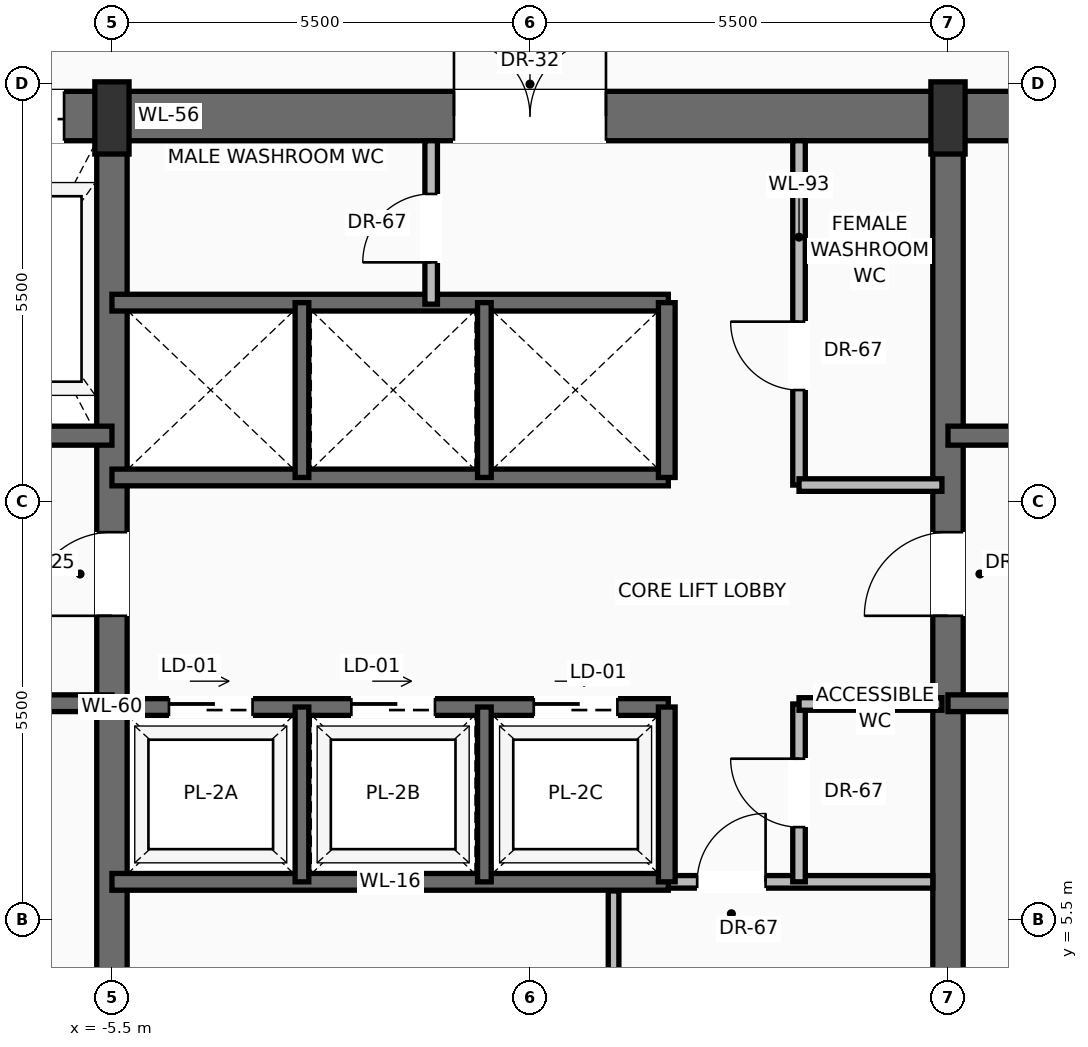
"""IFC4 building model, lengths in metres.
Left out: names, types, materials, properties, quantities, classifications, styles, units other than length and angle.
Written with IfcOpenShell. Run it as: python <this file> out.ifc"""

import sys

from ifc_helpers import new_model, si_unit, direction, frame, frame_2d, origin, origin_2d, place, context, subcontext, project, spatial, rectangle, extrude, source, transform, mapped, element, fill, save


model = new_model("IFC4")
c1 = context("Model", 3, precision=1e-05, world=origin(), true_north=direction((0.0, 1.0)))
c2 = subcontext(c1, "Body", "Model", "MODEL_VIEW")
j1 = project(units=[si_unit("LENGTHUNIT", "METRE"), si_unit("PLANEANGLEUNIT", "RADIAN")], contexts=[c1])
p1 = place(None, origin())
s1 = spatial("IfcSite", under=j1, at=p1, CompositionType="ELEMENT")
p2 = place(p1, origin())
s2 = spatial("IfcBuilding", under=s1, at=p2, CompositionType="ELEMENT")
p3 = place(p2, frame((0.0, 0.0, 133.0)))
s3 = spatial("IfcBuildingStorey", under=s2, at=p3, CompositionType="ELEMENT", Elevation=133.0)
p4 = place(p3, frame((-10.8, 16.075, 0.0), z_axis=(0.0, 0.0, 1.0), x_axis=(1.0, 0.0, 0.0)))
e1 = element("IfcWall", 1, at=p4, inside=s3, PredefinedType="SHEAR", context=c2, shape_type="SweptSolid", body=[
    extrude(rectangle(XDim=21.6, YDim=0.65, at=frame_2d((10.8, 0.0))), origin(), (0.0, 0.0, 1.0), 3.47),
])
p5 = place(p4, frame((3.37, 0.0, 0.0)))
e2 = element("IfcOpeningElement", 2, at=p5, cuts=e1, PredefinedType="OPENING", context=c2, shape_type="SweptSolid", body=[
    extrude(rectangle(XDim=1.3, YDim=2.3, at=frame_2d((0.65, 1.15))), frame((0.0, 0.335, 0.0), z_axis=(0.0, -1.0, 0.0), x_axis=(1.0, 0.0, 0.0)), (0.0, 0.0, 1.0), 0.67),
])
p6 = place(p4, frame((9.8, 0.0, 0.0)))
e3 = element("IfcOpeningElement", 3, at=p6, cuts=e1, PredefinedType="OPENING", context=c2, shape_type="SweptSolid", body=[
    extrude(rectangle(XDim=2.0, YDim=2.4, at=frame_2d((1.0, 1.2))), frame((0.0, 0.335, 0.0), z_axis=(0.0, -1.0, 0.0), x_axis=(1.0, 0.0, 0.0)), (0.0, 0.0, 1.0), 0.67),
])
p7 = place(p3, frame((-5.5, 0.525, 0.0), z_axis=(0.0, 0.0, 1.0), x_axis=(0.0, 1.0, 0.0)))
e4 = element("IfcWall", 4, at=p7, inside=s3, PredefinedType="SHEAR", context=c2, shape_type="SweptSolid", body=[
    extrude(rectangle(XDim=15.55, YDim=0.4, at=frame_2d((7.775, 0.0))), origin(), (0.0, 0.0, 1.0), 3.47),
])
p8 = place(p7, frame((8.975, 0.0, 0.0)))
e5 = element("IfcOpeningElement", 5, at=p8, cuts=e4, PredefinedType="OPENING", context=c2, shape_type="SweptSolid", body=[
    extrude(rectangle(XDim=1.1, YDim=2.2, at=frame_2d((0.55, 1.1))), frame((0.0, 0.21, 0.0), z_axis=(0.0, -1.0, 0.0), x_axis=(1.0, 0.0, 0.0)), (0.0, 0.0, 1.0), 0.42),
])
p9 = place(p3, frame((5.5, 0.525, 0.0), z_axis=(0.0, 0.0, 1.0), x_axis=(0.0, 1.0, 0.0)))
e6 = element("IfcWall", 6, at=p9, inside=s3, PredefinedType="SHEAR", context=c2, shape_type="SweptSolid", body=[
    extrude(rectangle(XDim=15.55, YDim=0.4, at=frame_2d((7.775, 0.0))), origin(), (0.0, 0.0, 1.0), 3.47),
])
p10 = place(p9, frame((8.975, 0.0, 0.0)))
e7 = element("IfcOpeningElement", 7, at=p10, cuts=e6, PredefinedType="OPENING", context=c2, shape_type="SweptSolid", body=[
    extrude(rectangle(XDim=1.1, YDim=2.2, at=frame_2d((0.55, 1.1))), frame((0.0, 0.21, 0.0), z_axis=(0.0, -1.0, 0.0), x_axis=(1.0, 0.0, 0.0)), (0.0, 0.0, 1.0), 0.42),
])
m1 = source(origin(), c2, "Body", "SweptSolid", [
    extrude(rectangle(XDim=0.45, YDim=0.95, at=origin_2d()), origin(), (0.0, 0.0, 1.0), 3.7),
])
for number, where, z_axis, x_axis in (
    (8, (-5.5, 16.05, 0.0), (0.0, 0.0, 1.0), (1.0, 0.0, 0.0)),
    (9, (5.5, 16.05, 0.0), (0.0, 0.0, 1.0), (1.0, 0.0, 0.0)),
):
    element("IfcColumn", number, at=place(p3, frame(where, z_axis=z_axis, x_axis=x_axis)), inside=s3, PredefinedType="PILASTER", context=c2, shape_type="MappedRepresentation", body=[
        mapped(m1, transform((0.0, 0.0, 0.0), scale=1.0)),
    ])
p11 = place(p3, frame((-5.5, 8.35, 0.0), z_axis=(0.0, 0.0, 1.0), x_axis=(-1.0, 0.0, 0.0)))
e10 = element("IfcWall", 10, at=p11, inside=s3, PredefinedType="SOLIDWALL", context=c2, shape_type="SweptSolid", body=[
    extrude(rectangle(XDim=4.65, YDim=0.22, at=frame_2d((2.325, 0.0))), origin(), (0.0, 0.0, 1.0), 3.47),
])
p12 = place(p11, frame((2.5, 0.0, 0.0)))
e11 = element("IfcOpeningElement", 11, at=p12, cuts=e10, PredefinedType="OPENING", context=c2, shape_type="SweptSolid", body=[
    extrude(rectangle(XDim=1.15, YDim=2.2, at=frame_2d((0.575, 1.1))), frame((0.0, 0.12, 0.0), z_axis=(0.0, -1.0, 0.0), x_axis=(1.0, 0.0, 0.0)), (0.0, 0.0, 1.0), 0.24),
])
p13 = place(p3, frame((-5.5, 11.87, 0.0), z_axis=(0.0, 0.0, 1.0), x_axis=(-1.0, 0.0, 0.0)))
e12 = element("IfcWall", 12, at=p13, inside=s3, PredefinedType="SOLIDWALL", context=c2, shape_type="SweptSolid", body=[
    extrude(rectangle(XDim=4.65, YDim=0.25, at=frame_2d((2.325, 0.0))), origin(), (0.0, 0.0, 1.0), 3.47),
])
p14 = place(p13, frame((2.95, 0.0, 0.0)))
e13 = element("IfcOpeningElement", 13, at=p14, cuts=e12, PredefinedType="OPENING", context=c2, shape_type="SweptSolid", body=[
    extrude(rectangle(XDim=1.2, YDim=2.25, at=frame_2d((0.6, 1.125))), frame((0.0, 0.135, 0.0), z_axis=(0.0, -1.0, 0.0), x_axis=(1.0, 0.0, 0.0)), (0.0, 0.0, 1.0), 0.27),
])
p15 = place(p3, frame((10.15, 8.35, 0.0), z_axis=(0.0, 0.0, 1.0), x_axis=(-1.0, 0.0, 0.0)))
e14 = element("IfcWall", 14, at=p15, inside=s3, PredefinedType="SOLIDWALL", context=c2, shape_type="SweptSolid", body=[
    extrude(rectangle(XDim=4.65, YDim=0.22, at=frame_2d((2.325, 0.0))), origin(), (0.0, 0.0, 1.0), 3.47),
])
p16 = place(p15, frame((1.0, 0.0, 0.0)))
e15 = element("IfcOpeningElement", 15, at=p16, cuts=e14, PredefinedType="OPENING", context=c2, shape_type="SweptSolid", body=[
    extrude(rectangle(XDim=1.15, YDim=2.2, at=frame_2d((0.575, 1.1))), frame((0.0, 0.12, 0.0), z_axis=(0.0, -1.0, 0.0), x_axis=(1.0, 0.0, 0.0)), (0.0, 0.0, 1.0), 0.24),
])
p17 = place(p3, frame((10.15, 11.87, 0.0), z_axis=(0.0, 0.0, 1.0), x_axis=(-1.0, 0.0, 0.0)))
e16 = element("IfcWall", 16, at=p17, inside=s3, PredefinedType="SOLIDWALL", context=c2, shape_type="SweptSolid", body=[
    extrude(rectangle(XDim=4.65, YDim=0.25, at=frame_2d((2.325, 0.0))), origin(), (0.0, 0.0, 1.0), 3.47),
])
p18 = place(p17, frame((0.5, 0.0, 0.0)))
e17 = element("IfcOpeningElement", 17, at=p18, cuts=e16, PredefinedType="OPENING", context=c2, shape_type="SweptSolid", body=[
    extrude(rectangle(XDim=1.2, YDim=2.25, at=frame_2d((0.6, 1.125))), frame((0.0, 0.135, 0.0), z_axis=(0.0, -1.0, 0.0), x_axis=(1.0, 0.0, 0.0)), (0.0, 0.0, 1.0), 0.27),
])
p19 = place(p3, frame((1.82, 6.0, 0.0), z_axis=(0.0, 0.0, 1.0), x_axis=(1.0, 0.0, 0.0)))
e18 = element("IfcWall", 18, at=p19, inside=s3, PredefinedType="PARTITIONING", context=c2, shape_type="SweptSolid", body=[
    extrude(rectangle(XDim=3.48, YDim=0.165, at=frame_2d((1.74, 0.0))), origin(), (0.0, 0.0, 1.0), 3.462),
])
p20 = place(p19, frame((0.38, 0.0, 0.0)))
e19 = element("IfcOpeningElement", 19, at=p20, cuts=e18, PredefinedType="OPENING", context=c2, shape_type="SweptSolid", body=[
    extrude(rectangle(XDim=0.9, YDim=2.1, at=frame_2d((0.45, 1.05))), frame((0.0, 0.093, 0.0), z_axis=(0.0, -1.0, 0.0), x_axis=(1.0, 0.0, 0.0)), (0.0, 0.0, 1.0), 0.185),
])
p21 = place(p3, frame((1.1, 0.85, 0.0), z_axis=(0.0, 0.0, 1.0), x_axis=(0.0, 1.0, 0.0)))
e20 = element("IfcWall", 20, at=p21, inside=s3, PredefinedType="PARTITIONING", context=c2, shape_type="SweptSolid", body=[
    extrude(rectangle(XDim=5.03, YDim=0.14, at=frame_2d((2.515, 0.0))), origin(), (0.0, 0.0, 1.0), 3.462),
])
p22 = place(p21, frame((2.1, 0.0, 0.0)))
e21 = element("IfcOpeningElement", 21, at=p22, cuts=e20, PredefinedType="OPENING", context=c2, shape_type="SweptSolid", body=[
    extrude(rectangle(XDim=0.9, YDim=2.1, at=frame_2d((0.45, 1.05))), frame((0.0, 0.08, 0.0), z_axis=(0.0, -1.0, 0.0), x_axis=(1.0, 0.0, 0.0)), (0.0, 0.0, 1.0), 0.16),
])
p23 = place(p3, frame((3.54, 6.0, 0.0), z_axis=(0.0, 0.0, 1.0), x_axis=(0.0, 1.0, 0.0)))
e22 = element("IfcWall", 22, at=p23, inside=s3, PredefinedType="PARTITIONING", context=c2, shape_type="SweptSolid", body=[
    extrude(rectangle(XDim=2.34, YDim=0.165, at=frame_2d((1.17, 0.0))), origin(), (0.0, 0.0, 1.0), 3.462),
])
p24 = place(p23, frame((0.72, 0.0, 0.0)))
e23 = element("IfcOpeningElement", 23, at=p24, cuts=e22, PredefinedType="OPENING", context=c2, shape_type="SweptSolid", body=[
    extrude(rectangle(XDim=0.9, YDim=2.1, at=frame_2d((0.45, 1.05))), frame((0.0, 0.093, 0.0), z_axis=(0.0, -1.0, 0.0), x_axis=(1.0, 0.0, 0.0)), (0.0, 0.0, 1.0), 0.185),
])
p25 = place(p3, frame((3.54, 8.34, 0.0), z_axis=(0.0, 0.0, 1.0), x_axis=(1.0, 0.0, 0.0)))
e24 = element("IfcWall", 24, at=p25, inside=s3, PredefinedType="PARTITIONING", context=c2, shape_type="SweptSolid", body=[
    extrude(rectangle(XDim=1.88, YDim=0.165, at=frame_2d((0.94, 0.0))), origin(), (0.0, 0.0, 1.0), 3.462),
])
p26 = place(p3, frame((-5.5, 6.0, 0.0), z_axis=(0.0, 0.0, 1.0), x_axis=(1.0, 0.0, 0.0)))
e25 = element("IfcWall", 25, at=p26, inside=s3, PredefinedType="SOLIDWALL", context=c2, shape_type="SweptSolid", body=[
    extrude(rectangle(XDim=7.32, YDim=0.22, at=frame_2d((3.66, 0.0))), origin(), (0.0, 0.0, 1.0), 3.47),
])
p27 = place(p3, frame((-5.5, 8.3, 0.0), z_axis=(0.0, 0.0, 1.0), x_axis=(1.0, 0.0, 0.0)))
e26 = element("IfcWall", 26, at=p27, inside=s3, PredefinedType="SOLIDWALL", context=c2, shape_type="SweptSolid", body=[
    extrude(rectangle(XDim=7.32, YDim=0.22, at=frame_2d((3.66, 0.0))), origin(), (0.0, 0.0, 1.0), 3.47),
])
p28 = place(p27, frame((0.75, 0.0, 0.0)))
e27 = element("IfcOpeningElement", 27, at=p28, cuts=e26, PredefinedType="OPENING", context=c2, shape_type="SweptSolid", body=[
    extrude(rectangle(XDim=1.1, YDim=2.2, at=frame_2d((0.55, 1.1))), frame((0.0, 0.12, 0.0), z_axis=(0.0, -1.0, 0.0), x_axis=(1.0, 0.0, 0.0)), (0.0, 0.0, 1.0), 0.24),
])
p29 = place(p27, frame((3.15, 0.0, 0.0)))
e28 = element("IfcOpeningElement", 28, at=p29, cuts=e26, PredefinedType="OPENING", context=c2, shape_type="SweptSolid", body=[
    extrude(rectangle(XDim=1.1, YDim=2.2, at=frame_2d((0.55, 1.1))), frame((0.0, 0.12, 0.0), z_axis=(0.0, -1.0, 0.0), x_axis=(1.0, 0.0, 0.0)), (0.0, 0.0, 1.0), 0.24),
])
p30 = place(p27, frame((5.55, 0.0, 0.0)))
e29 = element("IfcOpeningElement", 29, at=p30, cuts=e26, PredefinedType="OPENING", context=c2, shape_type="SweptSolid", body=[
    extrude(rectangle(XDim=1.1, YDim=2.2, at=frame_2d((0.55, 1.1))), frame((0.0, 0.12, 0.0), z_axis=(0.0, -1.0, 0.0), x_axis=(1.0, 0.0, 0.0)), (0.0, 0.0, 1.0), 0.24),
])
p31 = place(p3, frame((1.8, 6.0, 0.0), z_axis=(0.0, 0.0, 1.0), x_axis=(0.0, 1.0, 0.0)))
e30 = element("IfcWall", 30, at=p31, inside=s3, PredefinedType="SOLIDWALL", context=c2, shape_type="SweptSolid", body=[
    extrude(rectangle(XDim=2.3, YDim=0.22, at=frame_2d((1.15, 0.0))), origin(), (0.0, 0.0, 1.0), 3.47),
])
for number, where, z_axis, x_axis in (
    (31, (-3.0, 6.0, 0.0), (0.0, 0.0, 1.0), (0.0, 1.0, 0.0)),
    (32, (-0.6, 6.0, 0.0), (0.0, 0.0, 1.0), (0.0, 1.0, 0.0)),
):
    element("IfcWall", number, at=place(p3, frame(where, z_axis=z_axis, x_axis=x_axis)), inside=s3, PredefinedType="SOLIDWALL", context=c2, shape_type="SweptSolid", body=[
        extrude(rectangle(XDim=2.3, YDim=0.18, at=frame_2d((1.15, 0.0))), origin(), (0.0, 0.0, 1.0), 3.47),
    ])
for number, where, z_axis, x_axis in (
    (33, (-5.5, 11.32, 0.0), (0.0, 0.0, 1.0), (1.0, 0.0, 0.0)),
    (34, (-5.5, 13.62, 0.0), (0.0, 0.0, 1.0), (1.0, 0.0, 0.0)),
):
    element("IfcWall", number, at=place(p3, frame(where, z_axis=z_axis, x_axis=x_axis)), inside=s3, PredefinedType="SOLIDWALL", context=c2, shape_type="SweptSolid", body=[
        extrude(rectangle(XDim=7.32, YDim=0.22, at=frame_2d((3.66, 0.0))), origin(), (0.0, 0.0, 1.0), 3.47),
    ])
p32 = place(p3, frame((1.8, 11.32, 0.0), z_axis=(0.0, 0.0, 1.0), x_axis=(0.0, 1.0, 0.0)))
e35 = element("IfcWall", 35, at=p32, inside=s3, PredefinedType="SOLIDWALL", context=c2, shape_type="SweptSolid", body=[
    extrude(rectangle(XDim=2.3, YDim=0.22, at=frame_2d((1.15, 0.0))), origin(), (0.0, 0.0, 1.0), 3.47),
])
for number, where, z_axis, x_axis in (
    (36, (-3.0, 11.32, 0.0), (0.0, 0.0, 1.0), (0.0, 1.0, 0.0)),
    (37, (-0.6, 11.32, 0.0), (0.0, 0.0, 1.0), (0.0, 1.0, 0.0)),
):
    element("IfcWall", number, at=place(p3, frame(where, z_axis=z_axis, x_axis=x_axis)), inside=s3, PredefinedType="SOLIDWALL", context=c2, shape_type="SweptSolid", body=[
        extrude(rectangle(XDim=2.3, YDim=0.18, at=frame_2d((1.15, 0.0))), origin(), (0.0, 0.0, 1.0), 3.47),
    ])
p33 = place(p3, frame((-1.3, 13.6, 0.0), z_axis=(0.0, 0.0, 1.0), x_axis=(0.0, 1.0, 0.0)))
e38 = element("IfcWall", 38, at=p33, inside=s3, PredefinedType="PARTITIONING", context=c2, shape_type="SweptSolid", body=[
    extrude(rectangle(XDim=2.15, YDim=0.165, at=frame_2d((1.075, 0.0))), origin(), (0.0, 0.0, 1.0), 3.462),
])
p34 = place(p33, frame((0.55, 0.0, 0.0)))
e39 = element("IfcOpeningElement", 39, at=p34, cuts=e38, PredefinedType="OPENING", context=c2, shape_type="SweptSolid", body=[
    extrude(rectangle(XDim=0.9, YDim=2.1, at=frame_2d((0.45, 1.05))), frame((0.0, 0.093, 0.0), z_axis=(0.0, -1.0, 0.0), x_axis=(1.0, 0.0, 0.0)), (0.0, 0.0, 1.0), 0.185),
])
p35 = place(p3, frame((3.54, 11.22, 0.0), z_axis=(0.0, 0.0, 1.0), x_axis=(0.0, 1.0, 0.0)))
e40 = element("IfcWall", 40, at=p35, inside=s3, PredefinedType="PARTITIONING", context=c2, shape_type="SweptSolid", body=[
    extrude(rectangle(XDim=4.53, YDim=0.165, at=frame_2d((2.265, 0.0))), origin(), (0.0, 0.0, 1.0), 3.462),
])
p36 = place(p35, frame((1.25, 0.0, 0.0)))
e41 = element("IfcOpeningElement", 41, at=p36, cuts=e40, PredefinedType="OPENING", context=c2, shape_type="SweptSolid", body=[
    extrude(rectangle(XDim=0.9, YDim=2.1, at=frame_2d((0.45, 1.05))), frame((0.0, 0.093, 0.0), z_axis=(0.0, -1.0, 0.0), x_axis=(1.0, 0.0, 0.0)), (0.0, 0.0, 1.0), 0.185),
])
p37 = place(p3, frame((3.54, 11.22, 0.0), z_axis=(0.0, 0.0, 1.0), x_axis=(1.0, 0.0, 0.0)))
e42 = element("IfcWall", 42, at=p37, inside=s3, PredefinedType="PARTITIONING", context=c2, shape_type="SweptSolid", body=[
    extrude(rectangle(XDim=1.88, YDim=0.165, at=frame_2d((0.94, 0.0))), origin(), (0.0, 0.0, 1.0), 3.462),
])
m2 = source(origin(), c2, "Body", "SweptSolid", [
    extrude(rectangle(XDim=1.1, YDim=2.2, at=frame_2d((0.55, 1.1))), frame((0.0, 0.025, 0.0), z_axis=(0.0, -1.0, 0.0), x_axis=(1.0, 0.0, 0.0)), (0.0, 0.0, 1.0), 0.05),
])
p38 = place(p8, origin())
e43 = element("IfcDoor", 43, at=p38, inside=s3, OperationType="SINGLE_SWING_LEFT", PredefinedType="DOOR", context=c2, shape_type="MappedRepresentation", body=[
    mapped(m2, transform((0.0, 0.0, 0.0), scale=1.0)),
])
fill(e5, e43)
m3 = source(origin(), c2, "Body", "SweptSolid", [
    extrude(rectangle(XDim=1.3, YDim=2.3, at=frame_2d((0.65, 1.15))), frame((0.0, 0.025, 0.0), z_axis=(0.0, -1.0, 0.0), x_axis=(1.0, 0.0, 0.0)), (0.0, 0.0, 1.0), 0.05),
])
p39 = place(p5, origin())
e44 = element("IfcDoor", 44, at=p39, inside=s3, OperationType="SLIDING_TO_RIGHT", PredefinedType="DOOR", context=c2, shape_type="MappedRepresentation", body=[
    mapped(m3, transform((0.0, 0.0, 0.0), scale=1.0)),
])
fill(e2, e44)
p40 = place(p10, origin())
e45 = element("IfcDoor", 45, at=p40, inside=s3, OperationType="SINGLE_SWING_LEFT", PredefinedType="DOOR", context=c2, shape_type="MappedRepresentation", body=[
    mapped(m2, transform((0.0, 0.0, 0.0), scale=1.0)),
])
fill(e7, e45)
m4 = source(origin(), c2, "Body", "SweptSolid", [
    extrude(rectangle(XDim=2.0, YDim=2.4, at=frame_2d((1.0, 1.2))), frame((0.0, 0.025, 0.0), z_axis=(0.0, -1.0, 0.0), x_axis=(1.0, 0.0, 0.0)), (0.0, 0.0, 1.0), 0.05),
])
p41 = place(p6, origin())
e46 = element("IfcDoor", 46, at=p41, inside=s3, OperationType="DOUBLE_DOOR_SINGLE_SWING", PredefinedType="DOOR", context=c2, shape_type="MappedRepresentation", body=[
    mapped(m4, transform((0.0, 0.0, 0.0), scale=1.0)),
])
fill(e3, e46)
m5 = source(origin(), c2, "Body", "SweptSolid", [
    extrude(rectangle(XDim=0.9, YDim=2.1, at=frame_2d((0.45, 1.05))), frame((0.0, 0.025, 0.0), z_axis=(0.0, -1.0, 0.0), x_axis=(1.0, 0.0, 0.0)), (0.0, 0.0, 1.0), 0.05),
])
p42 = place(p20, origin())
e47 = element("IfcDoor", 47, at=p42, inside=s3, OperationType="SINGLE_SWING_RIGHT", PredefinedType="DOOR", context=c2, shape_type="MappedRepresentation", body=[
    mapped(m5, transform((0.0, 0.0, 0.0), scale=1.0)),
])
fill(e19, e47)
p43 = place(p24, origin())
e48 = element("IfcDoor", 48, at=p43, inside=s3, OperationType="SINGLE_SWING_RIGHT", PredefinedType="DOOR", context=c2, shape_type="MappedRepresentation", body=[
    mapped(m5, transform((0.0, 0.0, 0.0), scale=1.0)),
])
fill(e23, e48)
m6 = source(origin(), c2, "Body", "SweptSolid", [
    extrude(rectangle(XDim=1.1, YDim=2.2, at=frame_2d((0.55, 1.1))), frame((0.0, 0.025, 0.0), z_axis=(0.0, -1.0, 0.0), x_axis=(1.0, 0.0, 0.0)), (0.0, 0.0, 1.0), 0.05),
])
p44 = place(p28, origin())
e49 = element("IfcDoor", 49, at=p44, inside=s3, OperationType="SLIDING_TO_LEFT", PredefinedType="DOOR", context=c2, shape_type="MappedRepresentation", body=[
    mapped(m6, transform((0.0, 0.0, 0.0), scale=1.0)),
])
fill(e27, e49)
p45 = place(p29, origin())
e50 = element("IfcDoor", 50, at=p45, inside=s3, OperationType="SLIDING_TO_LEFT", PredefinedType="DOOR", context=c2, shape_type="MappedRepresentation", body=[
    mapped(m6, transform((0.0, 0.0, 0.0), scale=1.0)),
])
fill(e28, e50)
p46 = place(p30, origin())
e51 = element("IfcDoor", 51, at=p46, inside=s3, OperationType="SLIDING_TO_LEFT", PredefinedType="DOOR", context=c2, shape_type="MappedRepresentation", body=[
    mapped(m6, transform((0.0, 0.0, 0.0), scale=1.0)),
])
fill(e29, e51)
p47 = place(p34, origin())
e52 = element("IfcDoor", 52, at=p47, inside=s3, OperationType="SINGLE_SWING_LEFT", PredefinedType="DOOR", context=c2, shape_type="MappedRepresentation", body=[
    mapped(m5, transform((0.0, 0.0, 0.0), scale=1.0)),
])
fill(e39, e52)
p48 = place(p36, origin())
e53 = element("IfcDoor", 53, at=p48, inside=s3, OperationType="SINGLE_SWING_RIGHT", PredefinedType="DOOR", context=c2, shape_type="MappedRepresentation", body=[
    mapped(m5, transform((0.0, 0.0, 0.0), scale=1.0)),
])
fill(e41, e53)
save(model, sys.argv[1])
